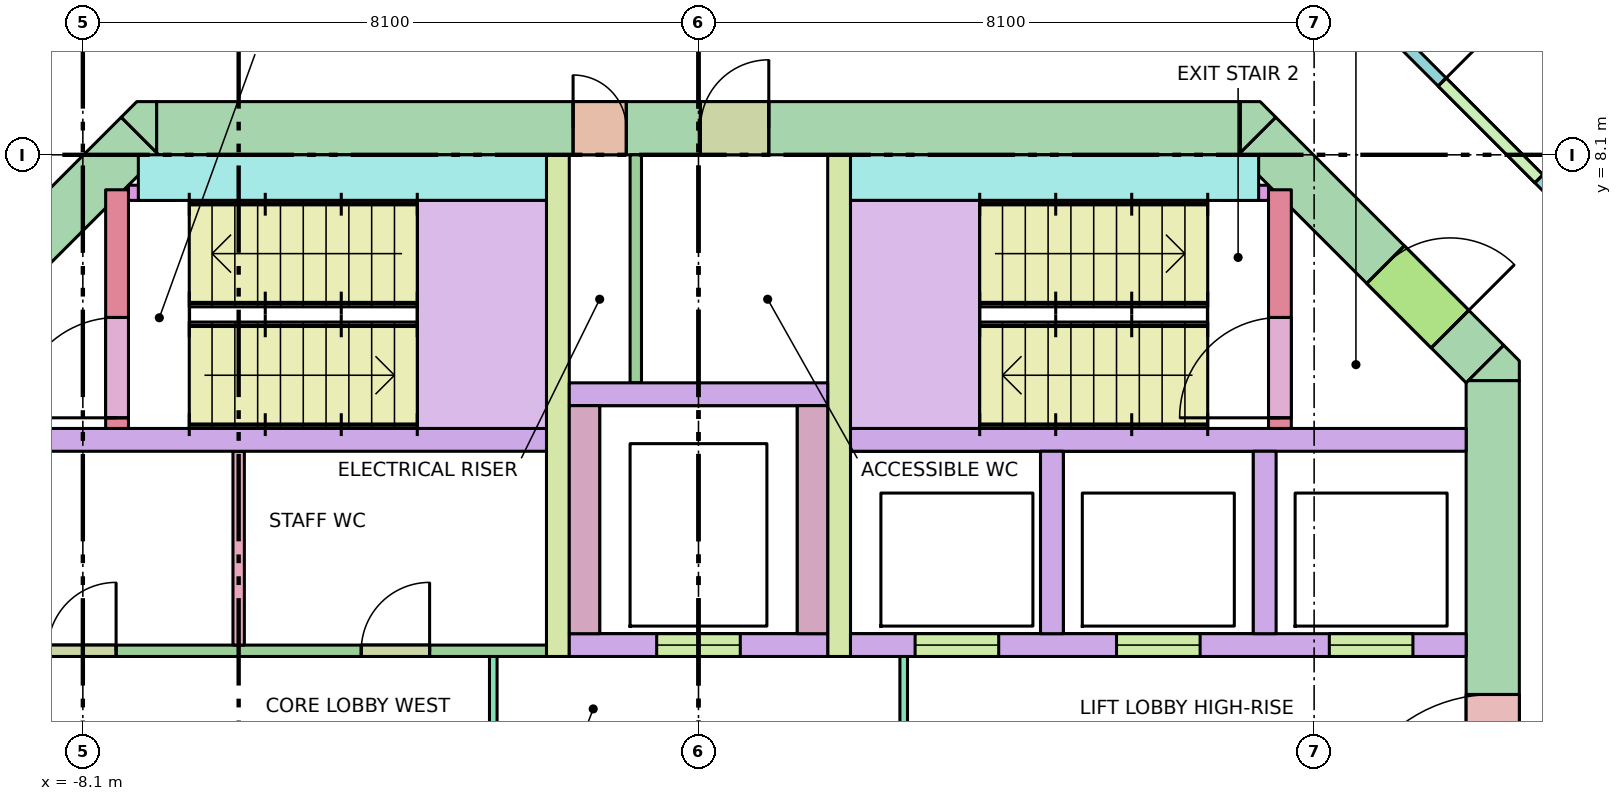
"""IFC4 building model, lengths in metres.
Left out: names, types, materials, properties, quantities, classifications, styles, units other than length and angle.
Written with IfcOpenShell. Run it as: python <this file> out.ifc"""

import sys

from ifc_helpers import new_model, si_unit, direction, frame, frame_2d, origin, place, context, subcontext, project, spatial, polyline, rectangle, outline, extrude, element, fill, save


model = new_model("IFC4")
c1 = context("Model", 3, precision=1e-05, world=origin(), true_north=direction((0.0, 1.0)))
c2 = subcontext(c1, "Body", "Model", "MODEL_VIEW")
j1 = project(units=[si_unit("LENGTHUNIT", "METRE"), si_unit("PLANEANGLEUNIT", "RADIAN")], contexts=[c1])
p1 = place(None, origin())
s1 = spatial("IfcSite", under=j1, at=p1, CompositionType="ELEMENT")
p2 = place(p1, origin())
s2 = spatial("IfcBuilding", under=s1, at=p2, CompositionType="ELEMENT")
p3 = place(p2, frame((0.0, 0.0, 211.3)))
s3 = spatial("IfcBuildingStorey", under=s2, at=p3, CompositionType="ELEMENT", Elevation=211.3)
p4 = place(p3, frame((-7.13, 8.45, -0.28), z_axis=(0.0, 0.0, 1.0), x_axis=(1.0, 0.0, 0.0)))
e1 = element("IfcWall", 1, at=p4, inside=s3, PredefinedType="SHEAR", context=c2, shape_type="SweptSolid", body=[
    extrude(rectangle(XDim=14.26, YDim=0.7, at=frame_2d((7.13, 0.0))), origin(), (0.0, 0.0, 1.0), 3.7),
])
p5 = place(p4, frame((5.48, 0.0, 0.28)))
e2 = element("IfcOpeningElement", 2, at=p5, cuts=e1, PredefinedType="OPENING", context=c2, shape_type="SweptSolid", body=[
    extrude(rectangle(XDim=0.7, YDim=2.1, at=frame_2d((0.35, 1.05))), frame((0.0, 0.36, 0.0), z_axis=(0.0, -1.0, 0.0), x_axis=(1.0, 0.0, 0.0)), (0.0, 0.0, 1.0), 0.72),
])
p6 = place(p4, frame((7.155, 0.0, 0.28)))
e3 = element("IfcOpeningElement", 3, at=p6, cuts=e1, PredefinedType="OPENING", context=c2, shape_type="SweptSolid", body=[
    extrude(rectangle(XDim=0.9, YDim=2.1, at=frame_2d((0.45, 1.05))), frame((0.0, 0.36, 0.0), z_axis=(0.0, -1.0, 0.0), x_axis=(1.0, 0.0, 0.0)), (0.0, 0.0, 1.0), 0.72),
])
p7 = place(p3, frame((10.45, -5.13, -0.28), z_axis=(0.0, 0.0, 1.0), x_axis=(0.0, 1.0, 0.0)))
e4 = element("IfcWall", 4, at=p7, inside=s3, PredefinedType="SHEAR", context=c2, shape_type="SweptSolid", body=[
    extrude(rectangle(XDim=10.26, YDim=0.7, at=frame_2d((5.13, 0.0))), origin(), (0.0, 0.0, 1.0), 3.7),
])
p8 = place(p7, frame((4.13, 0.0, 0.28)))
e5 = element("IfcOpeningElement", 5, at=p8, cuts=e4, PredefinedType="OPENING", context=c2, shape_type="SweptSolid", body=[
    extrude(rectangle(XDim=2.0, YDim=2.1, at=frame_2d((1.0, 1.05))), frame((0.0, 0.36, 0.0), z_axis=(0.0, -1.0, 0.0), x_axis=(1.0, 0.0, 0.0)), (0.0, 0.0, 1.0), 0.72),
])
p9 = place(p3, frame((-10.347, 5.347, -0.28), z_axis=(0.0, 0.0, 1.0), x_axis=(0.707106781187, 0.707106781187, 0.0)))
e6 = element("IfcWall", 6, at=p9, inside=s3, PredefinedType="SHEAR", context=c2, shape_type="SweptSolid", body=[
    extrude(rectangle(XDim=4.243, YDim=0.7, at=frame_2d((2.121, 0.0))), origin(), (0.0, 0.0, 1.0), 3.7),
])
p10 = place(p9, frame((0.65, 0.0, 0.28)))
e7 = element("IfcOpeningElement", 7, at=p10, cuts=e6, PredefinedType="OPENING", context=c2, shape_type="SweptSolid", body=[
    extrude(rectangle(XDim=1.2, YDim=2.1, at=frame_2d((0.6, 1.05))), frame((0.0, 0.36, 0.0), z_axis=(0.0, -1.0, 0.0), x_axis=(1.0, 0.0, 0.0)), (0.0, 0.0, 1.0), 0.72),
])
p11 = place(p3, frame((7.347, 8.347, -0.28), z_axis=(0.0, 0.0, 1.0), x_axis=(0.707106781187, -0.707106781187, 0.0)))
e8 = element("IfcWall", 8, at=p11, inside=s3, PredefinedType="SHEAR", context=c2, shape_type="SweptSolid", body=[
    extrude(rectangle(XDim=4.243, YDim=0.7, at=frame_2d((2.121, 0.0))), origin(), (0.0, 0.0, 1.0), 3.7),
])
p12 = place(p11, frame((2.393, 0.0, 0.28)))
e9 = element("IfcOpeningElement", 9, at=p12, cuts=e8, PredefinedType="OPENING", context=c2, shape_type="SweptSolid", body=[
    extrude(rectangle(XDim=1.2, YDim=2.1, at=frame_2d((0.6, 1.05))), frame((0.0, 0.36, 0.0), z_axis=(0.0, -1.0, 0.0), x_axis=(1.0, 0.0, 0.0)), (0.0, 0.0, 1.0), 0.72),
])
p13 = place(p3, frame((0.0, 0.0, -0.28)))
e10 = element("IfcWall", 10, at=p13, inside=s3, PredefinedType="SHEAR", context=c2, shape_type="SweptSolid", body=[
    extrude(outline(polyline([(10.8, 5.39), (10.8, 5.13), (10.8, 5.13), (10.13, 5.13), (10.595, 5.595), (10.595, 5.595), (10.595, 5.595), (10.8, 5.39)])), origin(), (0.0, 0.0, 1.0), 3.7),
])
p14 = place(p3, frame((0.0, 0.0, -0.28)))
e11 = element("IfcWall", 11, at=p14, inside=s3, PredefinedType="SHEAR", context=c2, shape_type="SweptSolid", body=[
    extrude(outline(polyline([(-7.39, 8.8), (-7.13, 8.8), (-7.13, 8.8), (-7.13, 8.13), (-7.595, 8.595), (-7.595, 8.595), (-7.595, 8.595), (-7.39, 8.8)])), origin(), (0.0, 0.0, 1.0), 3.7),
])
p15 = place(p3, frame((0.0, 0.0, -0.28)))
e12 = element("IfcWall", 12, at=p15, inside=s3, PredefinedType="SHEAR", context=c2, shape_type="SweptSolid", body=[
    extrude(outline(polyline([(7.39, 8.8), (7.595, 8.595), (7.595, 8.595), (7.595, 8.595), (7.13, 8.13), (7.13, 8.8), (7.13, 8.8), (7.39, 8.8)])), origin(), (0.0, 0.0, 1.0), 3.7),
])
for number, where, z_axis, x_axis in (
    (13, (-10.1, 4.35, 0.0), (0.0, 0.0, 1.0), (1.0, 0.0, 0.0)),
    (14, (2.0, 4.35, 0.0), (0.0, 0.0, 1.0), (1.0, 0.0, 0.0)),
):
    element("IfcWall", number, at=place(p3, frame(where, z_axis=z_axis, x_axis=x_axis)), inside=s3, PredefinedType="SOLIDWALL", context=c2, shape_type="SweptSolid", body=[
        extrude(rectangle(XDim=8.1, YDim=0.3, at=frame_2d((4.05, 0.0))), origin(), (0.0, 0.0, 1.0), 3.42),
    ])
p16 = place(p3, frame((2.0, 1.65, 0.0), z_axis=(0.0, 0.0, 1.0), x_axis=(1.0, 0.0, 0.0)))
e15 = element("IfcWall", 15, at=p16, inside=s3, PredefinedType="SOLIDWALL", context=c2, shape_type="SweptSolid", body=[
    extrude(rectangle(XDim=8.1, YDim=0.3, at=frame_2d((4.05, 0.0))), origin(), (0.0, 0.0, 1.0), 3.42),
])
p17 = place(p16, frame((0.85, 0.0, 0.0)))
e16 = element("IfcOpeningElement", 16, at=p17, cuts=e15, PredefinedType="OPENING", context=c2, shape_type="SweptSolid", body=[
    extrude(rectangle(XDim=1.1, YDim=2.1, at=frame_2d((0.55, 1.05))), frame((0.0, 0.16, 0.0), z_axis=(0.0, -1.0, 0.0), x_axis=(1.0, 0.0, 0.0)), (0.0, 0.0, 1.0), 0.32),
])
p18 = place(p16, frame((3.5, 0.0, 0.0)))
e17 = element("IfcOpeningElement", 17, at=p18, cuts=e15, PredefinedType="OPENING", context=c2, shape_type="SweptSolid", body=[
    extrude(rectangle(XDim=1.1, YDim=2.1, at=frame_2d((0.55, 1.05))), frame((0.0, 0.16, 0.0), z_axis=(0.0, -1.0, 0.0), x_axis=(1.0, 0.0, 0.0)), (0.0, 0.0, 1.0), 0.32),
])
p19 = place(p16, frame((6.3, 0.0, 0.0)))
e18 = element("IfcOpeningElement", 18, at=p19, cuts=e15, PredefinedType="OPENING", context=c2, shape_type="SweptSolid", body=[
    extrude(rectangle(XDim=1.1, YDim=2.1, at=frame_2d((0.55, 1.05))), frame((0.0, 0.16, 0.0), z_axis=(0.0, -1.0, 0.0), x_axis=(1.0, 0.0, 0.0)), (0.0, 0.0, 1.0), 0.32),
])
for number, where, z_axis, x_axis in (
    (19, (4.65, 1.8, 0.0), (0.0, 0.0, 1.0), (0.0, 1.0, 0.0)),
    (20, (7.45, 1.8, 0.0), (0.0, 0.0, 1.0), (0.0, 1.0, 0.0)),
):
    element("IfcWall", number, at=place(p3, frame(where, z_axis=z_axis, x_axis=x_axis)), inside=s3, PredefinedType="SOLIDWALL", context=c2, shape_type="SweptSolid", body=[
        extrude(rectangle(XDim=2.4, YDim=0.3, at=frame_2d((1.2, 0.0))), origin(), (0.0, 0.0, 1.0), 3.42),
    ])
for number, where, z_axis, x_axis in (
    (21, (-1.85, 1.5, 0.0), (0.0, 0.0, 1.0), (0.0, 1.0, 0.0)),
    (22, (1.85, 1.5, 0.0), (0.0, 0.0, 1.0), (0.0, 1.0, 0.0)),
):
    element("IfcWall", number, at=place(p3, frame(where, z_axis=z_axis, x_axis=x_axis)), inside=s3, PredefinedType="SHEAR", context=c2, shape_type="SweptSolid", body=[
        extrude(rectangle(XDim=6.6, YDim=0.3, at=frame_2d((3.3, 0.0))), origin(), (0.0, 0.0, 1.0), 3.42),
    ])
p20 = place(p3, frame((-1.7, 1.65, 0.0), z_axis=(0.0, 0.0, 1.0), x_axis=(1.0, 0.0, 0.0)))
e23 = element("IfcWall", 23, at=p20, inside=s3, PredefinedType="SOLIDWALL", context=c2, shape_type="SweptSolid", body=[
    extrude(rectangle(XDim=3.4, YDim=0.3, at=frame_2d((1.7, 0.0))), origin(), (0.0, 0.0, 1.0), 3.42),
])
p21 = place(p20, frame((1.15, 0.0, 0.0)))
e24 = element("IfcOpeningElement", 24, at=p21, cuts=e23, PredefinedType="OPENING", context=c2, shape_type="SweptSolid", body=[
    extrude(rectangle(XDim=1.1, YDim=2.1, at=frame_2d((0.55, 1.05))), frame((0.0, 0.16, 0.0), z_axis=(0.0, -1.0, 0.0), x_axis=(1.0, 0.0, 0.0)), (0.0, 0.0, 1.0), 0.32),
])
for number, where, z_axis, x_axis in (
    (25, (-1.5, 1.8, 0.0), (0.0, 0.0, 1.0), (0.0, 1.0, 0.0)),
    (26, (1.5, 1.8, 0.0), (0.0, 0.0, 1.0), (0.0, 1.0, 0.0)),
):
    element("IfcWall", number, at=place(p3, frame(where, z_axis=z_axis, x_axis=x_axis)), inside=s3, PredefinedType="SOLIDWALL", context=c2, shape_type="SweptSolid", body=[
        extrude(rectangle(XDim=3.0, YDim=0.4, at=frame_2d((1.5, 0.0))), origin(), (0.0, 0.0, 1.0), 3.42),
    ])
p22 = place(p3, frame((-1.7, 4.95, 0.0), z_axis=(0.0, 0.0, 1.0), x_axis=(1.0, 0.0, 0.0)))
e27 = element("IfcWall", 27, at=p22, inside=s3, PredefinedType="SOLIDWALL", context=c2, shape_type="SweptSolid", body=[
    extrude(rectangle(XDim=3.4, YDim=0.3, at=frame_2d((1.7, 0.0))), origin(), (0.0, 0.0, 1.0), 3.42),
])
p23 = place(p3, frame((-7.65, 4.5, 0.0), z_axis=(0.0, 0.0, 1.0), x_axis=(0.0, 1.0, 0.0)))
e28 = element("IfcWall", 28, at=p23, inside=s3, PredefinedType="SHEAR", context=c2, shape_type="SweptSolid", body=[
    extrude(rectangle(XDim=3.14, YDim=0.3, at=frame_2d((1.57, 0.0))), origin(), (0.0, 0.0, 1.0), 3.42),
])
p24 = place(p23, frame((0.14, 0.0, 0.0)))
e29 = element("IfcOpeningElement", 29, at=p24, cuts=e28, PredefinedType="OPENING", context=c2, shape_type="SweptSolid", body=[
    extrude(rectangle(XDim=1.32, YDim=2.1, at=frame_2d((0.66, 1.05))), frame((0.0, 0.16, 0.0), z_axis=(0.0, -1.0, 0.0), x_axis=(1.0, 0.0, 0.0)), (0.0, 0.0, 1.0), 0.32),
])
p25 = place(p3, frame((-7.37, 7.8, 0.0), z_axis=(0.0, 0.0, 1.0), x_axis=(1.0, 0.0, 0.0)))
e30 = element("IfcWall", 30, at=p25, inside=s3, PredefinedType="SHEAR", context=c2, shape_type="SweptSolid", body=[
    extrude(rectangle(XDim=5.37, YDim=0.6, at=frame_2d((2.685, 0.0))), origin(), (0.0, 0.0, 1.0), 3.42),
])
p26 = place(p3, frame((7.65, 4.5, 0.0), z_axis=(0.0, 0.0, 1.0), x_axis=(0.0, 1.0, 0.0)))
e31 = element("IfcWall", 31, at=p26, inside=s3, PredefinedType="SHEAR", context=c2, shape_type="SweptSolid", body=[
    extrude(rectangle(XDim=3.14, YDim=0.3, at=frame_2d((1.57, 0.0))), origin(), (0.0, 0.0, 1.0), 3.42),
])
p27 = place(p26, frame((0.14, 0.0, 0.0)))
e32 = element("IfcOpeningElement", 32, at=p27, cuts=e31, PredefinedType="OPENING", context=c2, shape_type="SweptSolid", body=[
    extrude(rectangle(XDim=1.32, YDim=2.1, at=frame_2d((0.66, 1.05))), frame((0.0, 0.16, 0.0), z_axis=(0.0, -1.0, 0.0), x_axis=(1.0, 0.0, 0.0)), (0.0, 0.0, 1.0), 0.32),
])
p28 = place(p3, frame((2.0, 7.8, 0.0), z_axis=(0.0, 0.0, 1.0), x_axis=(1.0, 0.0, 0.0)))
e33 = element("IfcWall", 33, at=p28, inside=s3, PredefinedType="SHEAR", context=c2, shape_type="SweptSolid", body=[
    extrude(rectangle(XDim=5.37, YDim=0.6, at=frame_2d((2.685, 0.0))), origin(), (0.0, 0.0, 1.0), 3.42),
])
for number, where, z_axis, x_axis in (
    (34, (-7.5, 7.6, 0.0), (0.0, 0.0, 1.0), (1.0, 0.0, 0.0)),
    (35, (6.9, 7.6, 0.0), (0.0, 0.0, 1.0), (1.0, 0.0, 0.0)),
):
    element("IfcWall", number, at=place(p3, frame(where, z_axis=z_axis, x_axis=x_axis)), inside=s3, PredefinedType="SHEAR", context=c2, shape_type="SweptSolid", body=[
        extrude(rectangle(XDim=0.6, YDim=0.2, at=frame_2d((0.3, 0.0))), origin(), (0.0, 0.0, 1.0), 3.42),
    ])
p29 = place(p3, frame((-2.7, -1.5, 0.0), z_axis=(0.0, 0.0, 1.0), x_axis=(0.0, 1.0, 0.0)))
e36 = element("IfcWall", 36, at=p29, inside=s3, PredefinedType="PARTITIONING", context=c2, shape_type="SweptSolid", body=[
    extrude(rectangle(XDim=3.0, YDim=0.1, at=frame_2d((1.5, 0.0))), origin(), (0.0, 0.0, 1.0), 3.42),
])
p30 = place(p29, frame((0.9, 0.0, 0.0)))
e37 = element("IfcOpeningElement", 37, at=p30, cuts=e36, PredefinedType="OPENING", context=c2, shape_type="SweptSolid", body=[
    extrude(rectangle(XDim=1.2, YDim=2.1, at=frame_2d((0.6, 1.05))), frame((0.0, 0.06, 0.0), z_axis=(0.0, -1.0, 0.0), x_axis=(1.0, 0.0, 0.0)), (0.0, 0.0, 1.0), 0.12),
])
p31 = place(p3, frame((2.7, -1.5, 0.0), z_axis=(0.0, 0.0, 1.0), x_axis=(0.0, 1.0, 0.0)))
e38 = element("IfcWall", 38, at=p31, inside=s3, PredefinedType="PARTITIONING", context=c2, shape_type="SweptSolid", body=[
    extrude(rectangle(XDim=3.0, YDim=0.1, at=frame_2d((1.5, 0.0))), origin(), (0.0, 0.0, 1.0), 3.42),
])
p32 = place(p31, frame((0.9, 0.0, 0.0)))
e39 = element("IfcOpeningElement", 39, at=p32, cuts=e38, PredefinedType="OPENING", context=c2, shape_type="SweptSolid", body=[
    extrude(rectangle(XDim=1.2, YDim=2.1, at=frame_2d((0.6, 1.05))), frame((0.0, 0.06, 0.0), z_axis=(0.0, -1.0, 0.0), x_axis=(1.0, 0.0, 0.0)), (0.0, 0.0, 1.0), 0.12),
])
p33 = place(p3, frame((-0.825, 5.1, 0.0), z_axis=(0.0, 0.0, 1.0), x_axis=(0.0, 1.0, 0.0)))
e40 = element("IfcWall", 40, at=p33, inside=s3, PredefinedType="PARTITIONING", context=c2, shape_type="SweptSolid", body=[
    extrude(rectangle(XDim=3.0, YDim=0.15, at=frame_2d((1.5, 0.0))), origin(), (0.0, 0.0, 1.0), 3.42),
])
p34 = place(p3, frame((-6.05, 1.65, 0.0), z_axis=(0.0, 0.0, 1.0), x_axis=(0.0, 1.0, 0.0)))
e41 = element("IfcWall", 41, at=p34, inside=s3, PredefinedType="PARTITIONING", context=c2, shape_type="SweptSolid", body=[
    extrude(rectangle(XDim=2.55, YDim=0.15, at=frame_2d((1.275, 0.0))), origin(), (0.0, 0.0, 1.0), 3.42),
])
p35 = place(p3, frame((-10.1, 1.575, 0.0), z_axis=(0.0, 0.0, 1.0), x_axis=(1.0, 0.0, 0.0)))
e42 = element("IfcWall", 42, at=p35, inside=s3, PredefinedType="PARTITIONING", context=c2, shape_type="SweptSolid", body=[
    extrude(rectangle(XDim=8.1, YDim=0.15, at=frame_2d((4.05, 0.0))), origin(), (0.0, 0.0, 1.0), 3.42),
])
p36 = place(p35, frame((1.538, 0.0, 0.0)))
e43 = element("IfcOpeningElement", 43, at=p36, cuts=e42, PredefinedType="OPENING", context=c2, shape_type="SweptSolid", body=[
    extrude(rectangle(XDim=0.9, YDim=2.1, at=frame_2d((0.45, 1.05))), frame((0.0, 0.085, 0.0), z_axis=(0.0, -1.0, 0.0), x_axis=(1.0, 0.0, 0.0)), (0.0, 0.0, 1.0), 0.17),
])
p37 = place(p35, frame((5.663, 0.0, 0.0)))
e44 = element("IfcOpeningElement", 44, at=p37, cuts=e42, PredefinedType="OPENING", context=c2, shape_type="SweptSolid", body=[
    extrude(rectangle(XDim=0.9, YDim=2.1, at=frame_2d((0.45, 1.05))), frame((0.0, 0.085, 0.0), z_axis=(0.0, -1.0, 0.0), x_axis=(1.0, 0.0, 0.0)), (0.0, 0.0, 1.0), 0.17),
])
p38 = place(p3, frame((-12.638, 6.204, 0.0), z_axis=(0.0, 0.0, 1.0), x_axis=(0.707106781187, 0.707106781187, 0.0)))
e45 = element("IfcWall", 45, at=p38, inside=s3, PredefinedType="PARTITIONING", context=c2, shape_type="SweptSolid", body=[
    extrude(rectangle(XDim=6.271, YDim=0.15, at=frame_2d((3.135, 0.0))), origin(), (0.0, 0.0, 1.0), 2.62),
])
p39 = place(p38, frame((4.935, 0.0, 0.0)))
e46 = element("IfcOpeningElement", 46, at=p39, cuts=e45, PredefinedType="OPENING", context=c2, shape_type="SweptSolid", body=[
    extrude(rectangle(XDim=0.9, YDim=2.1, at=frame_2d((0.45, 1.05))), frame((0.0, 0.085, 0.0), z_axis=(0.0, -1.0, 0.0), x_axis=(1.0, 0.0, 0.0)), (0.0, 0.0, 1.0), 0.17),
])
p40 = place(p38, frame((2.314, 0.0, 0.0)))
e47 = element("IfcOpeningElement", 47, at=p40, cuts=e45, PredefinedType="OPENING", context=c2, shape_type="SweptSolid", body=[
    extrude(rectangle(XDim=0.9, YDim=2.1, at=frame_2d((0.45, 1.05))), frame((0.0, 0.085, 0.0), z_axis=(0.0, -1.0, 0.0), x_axis=(1.0, 0.0, 0.0)), (0.0, 0.0, 1.0), 0.17),
])
p41 = place(p3, frame((8.204, 10.638, 0.0), z_axis=(0.0, 0.0, 1.0), x_axis=(0.707106781187, -0.707106781187, 0.0)))
e48 = element("IfcWall", 48, at=p41, inside=s3, PredefinedType="PARTITIONING", context=c2, shape_type="SweptSolid", body=[
    extrude(rectangle(XDim=6.271, YDim=0.15, at=frame_2d((3.135, 0.0))), origin(), (0.0, 0.0, 1.0), 2.62),
])
p42 = place(p41, frame((2.235, 0.0, 0.0)))
e49 = element("IfcOpeningElement", 49, at=p42, cuts=e48, PredefinedType="OPENING", context=c2, shape_type="SweptSolid", body=[
    extrude(rectangle(XDim=1.8, YDim=2.1, at=frame_2d((0.9, 1.05))), frame((0.0, 0.085, 0.0), z_axis=(0.0, -1.0, 0.0), x_axis=(1.0, 0.0, 0.0)), (0.0, 0.0, 1.0), 0.17),
])
p43 = place(p17, origin())
e50 = element("IfcDoor", 50, at=p43, inside=s3, OperationType="DOUBLE_DOOR_SLIDING", PredefinedType="DOOR", context=c2, shape_type="SweptSolid", body=[
    extrude(rectangle(XDim=1.1, YDim=2.1, at=frame_2d((0.55, 1.05))), frame((0.0, 0.025, 0.0), z_axis=(0.0, -1.0, 0.0), x_axis=(1.0, 0.0, 0.0)), (0.0, 0.0, 1.0), 0.05),
])
fill(e16, e50)
p44 = place(p18, origin())
e51 = element("IfcDoor", 51, at=p44, inside=s3, OperationType="DOUBLE_DOOR_SLIDING", PredefinedType="DOOR", context=c2, shape_type="SweptSolid", body=[
    extrude(rectangle(XDim=1.1, YDim=2.1, at=frame_2d((0.55, 1.05))), frame((0.0, 0.025, 0.0), z_axis=(0.0, -1.0, 0.0), x_axis=(1.0, 0.0, 0.0)), (0.0, 0.0, 1.0), 0.05),
])
fill(e17, e51)
p45 = place(p19, origin())
e52 = element("IfcDoor", 52, at=p45, inside=s3, OperationType="DOUBLE_DOOR_SLIDING", PredefinedType="DOOR", context=c2, shape_type="SweptSolid", body=[
    extrude(rectangle(XDim=1.1, YDim=2.1, at=frame_2d((0.55, 1.05))), frame((0.0, 0.025, 0.0), z_axis=(0.0, -1.0, 0.0), x_axis=(1.0, 0.0, 0.0)), (0.0, 0.0, 1.0), 0.05),
])
fill(e18, e52)
p46 = place(p21, origin())
e53 = element("IfcDoor", 53, at=p46, inside=s3, OperationType="DOUBLE_DOOR_SLIDING", PredefinedType="DOOR", context=c2, shape_type="SweptSolid", body=[
    extrude(rectangle(XDim=1.1, YDim=2.1, at=frame_2d((0.55, 1.05))), frame((0.0, 0.025, 0.0), z_axis=(0.0, -1.0, 0.0), x_axis=(1.0, 0.0, 0.0)), (0.0, 0.0, 1.0), 0.05),
])
fill(e24, e53)
p47 = place(p24, origin())
e54 = element("IfcDoor", 54, at=p47, inside=s3, OperationType="DOUBLE_DOOR_SINGLE_SWING", PredefinedType="DOOR", context=c2, shape_type="SweptSolid", body=[
    extrude(rectangle(XDim=1.32, YDim=2.1, at=frame_2d((0.66, 1.05))), frame((0.0, 0.025, 0.0), z_axis=(0.0, -1.0, 0.0), x_axis=(1.0, 0.0, 0.0)), (0.0, 0.0, 1.0), 0.05),
])
fill(e29, e54)
p48 = place(p27, origin())
e55 = element("IfcDoor", 55, at=p48, inside=s3, OperationType="DOUBLE_DOOR_SINGLE_SWING", PredefinedType="DOOR", context=c2, shape_type="SweptSolid", body=[
    extrude(rectangle(XDim=1.32, YDim=2.1, at=frame_2d((0.66, 1.05))), frame((0.0, 0.025, 0.0), z_axis=(0.0, -1.0, 0.0), x_axis=(1.0, 0.0, 0.0)), (0.0, 0.0, 1.0), 0.05),
])
fill(e32, e55)
p49 = place(p12, origin())
e56 = element("IfcDoor", 56, at=p49, inside=s3, OperationType="SINGLE_SWING_RIGHT", PredefinedType="DOOR", context=c2, shape_type="SweptSolid", body=[
    extrude(rectangle(XDim=1.2, YDim=2.1, at=frame_2d((0.6, 1.05))), frame((0.0, 0.025, 0.0), z_axis=(0.0, -1.0, 0.0), x_axis=(1.0, 0.0, 0.0)), (0.0, 0.0, 1.0), 0.05),
])
fill(e9, e56)
p50 = place(p8, origin())
e57 = element("IfcDoor", 57, at=p50, inside=s3, OperationType="DOUBLE_DOOR_SINGLE_SWING", PredefinedType="DOOR", context=c2, shape_type="SweptSolid", body=[
    extrude(rectangle(XDim=2.0, YDim=2.1, at=frame_2d((1.0, 1.05))), frame((0.0, 0.025, 0.0), z_axis=(0.0, -1.0, 0.0), x_axis=(1.0, 0.0, 0.0)), (0.0, 0.0, 1.0), 0.05),
])
fill(e5, e57)
p51 = place(p5, origin())
e58 = element("IfcDoor", 58, at=p51, inside=s3, OperationType="SINGLE_SWING_LEFT", PredefinedType="DOOR", context=c2, shape_type="SweptSolid", body=[
    extrude(rectangle(XDim=0.7, YDim=2.1, at=frame_2d((0.35, 1.05))), frame((0.0, 0.025, 0.0), z_axis=(0.0, -1.0, 0.0), x_axis=(1.0, 0.0, 0.0)), (0.0, 0.0, 1.0), 0.05),
])
fill(e2, e58)
p52 = place(p6, origin())
e59 = element("IfcDoor", 59, at=p52, inside=s3, OperationType="SINGLE_SWING_RIGHT", PredefinedType="DOOR", context=c2, shape_type="SweptSolid", body=[
    extrude(rectangle(XDim=0.9, YDim=2.1, at=frame_2d((0.45, 1.05))), frame((0.0, 0.025, 0.0), z_axis=(0.0, -1.0, 0.0), x_axis=(1.0, 0.0, 0.0)), (0.0, 0.0, 1.0), 0.05),
])
fill(e3, e59)
p53 = place(p36, origin())
e60 = element("IfcDoor", 60, at=p53, inside=s3, OperationType="SINGLE_SWING_RIGHT", PredefinedType="DOOR", context=c2, shape_type="SweptSolid", body=[
    extrude(rectangle(XDim=0.9, YDim=2.1, at=frame_2d((0.45, 1.05))), frame((0.0, 0.025, 0.0), z_axis=(0.0, -1.0, 0.0), x_axis=(1.0, 0.0, 0.0)), (0.0, 0.0, 1.0), 0.05),
])
fill(e43, e60)
p54 = place(p37, origin())
e61 = element("IfcDoor", 61, at=p54, inside=s3, OperationType="SINGLE_SWING_RIGHT", PredefinedType="DOOR", context=c2, shape_type="SweptSolid", body=[
    extrude(rectangle(XDim=0.9, YDim=2.1, at=frame_2d((0.45, 1.05))), frame((0.0, 0.025, 0.0), z_axis=(0.0, -1.0, 0.0), x_axis=(1.0, 0.0, 0.0)), (0.0, 0.0, 1.0), 0.05),
])
fill(e44, e61)
p55 = place(p42, origin())
e62 = element("IfcDoor", 62, at=p55, inside=s3, OperationType="DOUBLE_DOOR_SINGLE_SWING", PredefinedType="DOOR", context=c2, shape_type="SweptSolid", body=[
    extrude(rectangle(XDim=1.8, YDim=2.1, at=frame_2d((0.9, 1.05))), frame((0.0, 0.025, 0.0), z_axis=(0.0, -1.0, 0.0), x_axis=(1.0, 0.0, 0.0)), (0.0, 0.0, 1.0), 0.05),
])
fill(e49, e62)
save(model, sys.argv[1])
